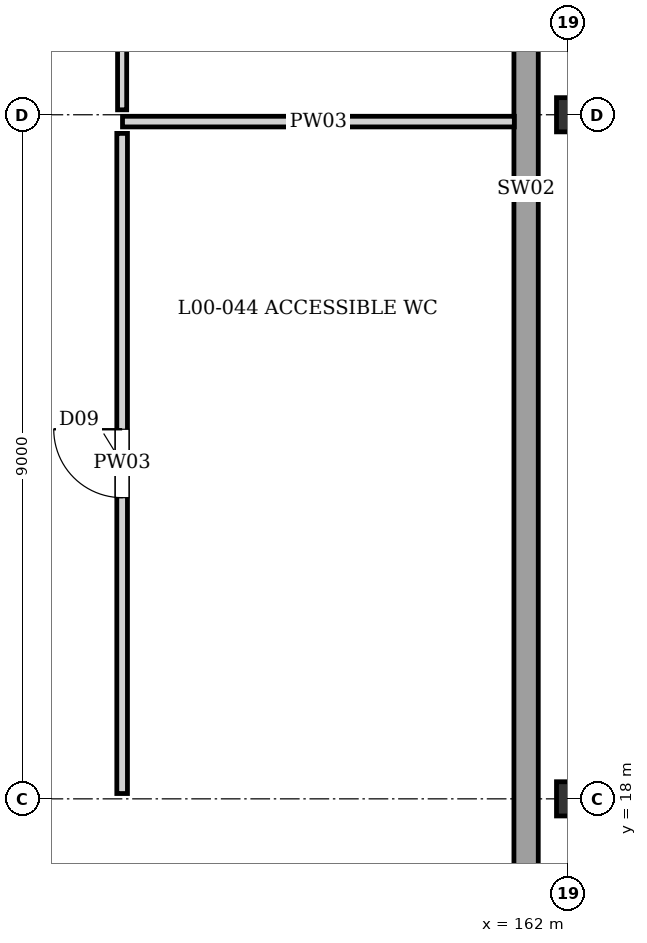
"""IFC4 building model, lengths in metres.
Left out: names, types, materials, properties, quantities, classifications, styles, units other than length and angle.
Written with IfcOpenShell. Run it as: python <this file> out.ifc"""

import sys

from ifc_helpers import new_model, si_unit, direction, frame, frame_2d, origin, origin_2d, place, context, subcontext, project, spatial, rectangle, i_section, extrude, element, fill, save


model = new_model("IFC4")
c1 = context("Model", 3, precision=1e-05, world=origin(), true_north=direction((0.0, 1.0)))
c2 = subcontext(c1, "Body", "Model", "MODEL_VIEW")
j1 = project(units=[si_unit("LENGTHUNIT", "METRE"), si_unit("PLANEANGLEUNIT", "RADIAN")], contexts=[c1])
p1 = place(None, origin())
s1 = spatial("IfcSite", under=j1, at=p1, CompositionType="ELEMENT")
p2 = place(p1, origin())
s2 = spatial("IfcBuilding", under=s1, at=p2, CompositionType="ELEMENT")
p3 = place(p2, origin())
s3 = spatial("IfcBuildingStorey", under=s2, at=p3, CompositionType="ELEMENT", Elevation=0.0)
for number, where, z_axis, x_axis in (
    (1, (162.0, 18.0, 0.0), (0.0, 0.0, 1.0), (1.0, 0.0, 0.0)),
    (2, (162.0, 27.0, 0.0), (0.0, 0.0, 1.0), (1.0, 0.0, 0.0)),
):
    element("IfcColumn", number, at=place(p3, frame(where, z_axis=z_axis, x_axis=x_axis)), inside=s3, PredefinedType="COLUMN", context=c2, shape_type="SweptSolid", body=[
        extrude(i_section(OverallWidth=0.3, OverallDepth=0.45, WebThickness=0.014, FlangeThickness=0.026, at=origin_2d()), origin(), (0.0, 0.0, 1.0), 4.32),
    ])
p4 = place(p3, frame((161.45, 12.65, 0.0), z_axis=(0.0, 0.0, 1.0), x_axis=(0.0, 1.0, 0.0)))
e3 = element("IfcWall", 3, at=p4, inside=s3, PredefinedType="SHEAR", context=c2, shape_type="SweptSolid", body=[
    extrude(rectangle(XDim=32.35, YDim=0.32, at=frame_2d((16.175, 0.0))), origin(), (0.0, 0.0, 1.0), 4.055),
])
p5 = place(p3, frame((156.14, 26.91, 0.0), z_axis=(0.0, 0.0, 1.0), x_axis=(1.0, 0.0, 0.0)))
e4 = element("IfcWall", 4, at=p5, inside=s3, PredefinedType="PLUMBINGWALL", context=c2, shape_type="SweptSolid", body=[
    extrude(rectangle(XDim=5.155, YDim=0.14, at=frame_2d((2.578, 0.0))), origin(), (0.0, 0.0, 1.0), 4.055),
])
p6 = place(p3, frame((156.135, 18.07, 0.0), z_axis=(0.0, 0.0, 1.0), x_axis=(0.0, 1.0, 0.0)))
e5 = element("IfcWall", 5, at=p6, inside=s3, PredefinedType="PLUMBINGWALL", context=c2, shape_type="SweptSolid", body=[
    extrude(rectangle(XDim=8.685, YDim=0.14, at=frame_2d((4.342, 0.0))), origin(), (0.0, 0.0, 1.0), 4.055),
])
p7 = place(p6, frame((3.893, 0.0, 0.0)))
e6 = element("IfcOpeningElement", 6, at=p7, cuts=e5, PredefinedType="OPENING", context=c2, shape_type="SweptSolid", body=[
    extrude(rectangle(XDim=0.9, YDim=2.1, at=frame_2d((0.45, 1.05))), frame((0.0, 0.08, 0.0), z_axis=(0.0, -1.0, 0.0), x_axis=(1.0, 0.0, 0.0)), (0.0, 0.0, 1.0), 0.16),
])
p8 = place(p3, frame((156.135, 27.065, 0.0), z_axis=(0.0, 0.0, 1.0), x_axis=(0.0, 1.0, 0.0)))
e7 = element("IfcWall", 7, at=p8, inside=s3, PredefinedType="PARTITIONING", context=c2, shape_type="SweptSolid", body=[
    extrude(rectangle(XDim=17.79, YDim=0.12, at=frame_2d((8.895, 0.0))), origin(), (0.0, 0.0, 1.0), 4.055),
])
p9 = place(p8, frame((14.89, 0.0, 0.0)))
e8 = element("IfcOpeningElement", 8, at=p9, cuts=e7, PredefinedType="OPENING", context=c2, shape_type="SweptSolid", body=[
    extrude(rectangle(XDim=1.0, YDim=2.1, at=frame_2d((0.5, 1.05))), frame((0.0, 0.07, 0.0), z_axis=(0.0, -1.0, 0.0), x_axis=(1.0, 0.0, 0.0)), (0.0, 0.0, 1.0), 0.14),
])
p10 = place(p7, origin())
e9 = element("IfcDoor", 9, at=p10, inside=s3, OperationType="SINGLE_SWING_RIGHT", PredefinedType="DOOR", context=c2, shape_type="SweptSolid", body=[
    extrude(rectangle(XDim=0.9, YDim=2.1, at=frame_2d((0.45, 1.05))), frame((0.0, 0.025, 0.0), z_axis=(0.0, -1.0, 0.0), x_axis=(1.0, 0.0, 0.0)), (0.0, 0.0, 1.0), 0.05),
])
fill(e6, e9)
save(model, sys.argv[1])
